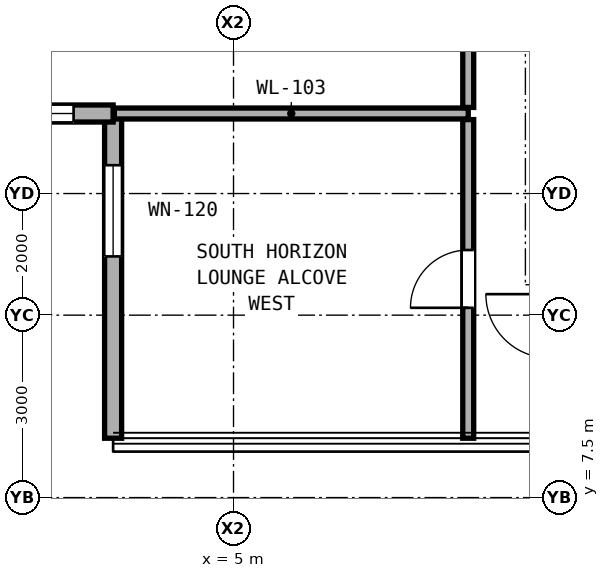
"""IFC4 building model, lengths in metres.
Left out: names, types, materials, properties, quantities, classifications, styles, units other than length and angle.
Written with IfcOpenShell. Run it as: python <this file> out.ifc"""

import sys

from ifc_helpers import new_model, si_unit, direction, frame, frame_2d, origin, place, context, subcontext, project, spatial, rectangle, extrude, element, fill, save


model = new_model("IFC4")
c1 = context("Model", 3, precision=1e-05, world=origin(), true_north=direction((0.0, 1.0)))
c2 = subcontext(c1, "Body", "Model", "MODEL_VIEW")
j1 = project(units=[si_unit("LENGTHUNIT", "METRE"), si_unit("PLANEANGLEUNIT", "RADIAN")], contexts=[c1])
p1 = place(None, origin())
s1 = spatial("IfcSite", under=j1, at=p1, CompositionType="ELEMENT")
p2 = place(p1, origin())
s2 = spatial("IfcBuilding", under=s1, at=p2, CompositionType="ELEMENT")
p3 = place(p2, frame((0.0, 0.0, 78.5)))
s3 = spatial("IfcBuildingStorey", under=s2, at=p3, CompositionType="ELEMENT", Elevation=78.5)
p4 = place(p3, frame((3.02, 13.816, 0.0), z_axis=(0.0, 0.0, 1.0), x_axis=(0.0, -1.0, 0.0)))
e1 = element("IfcWall", 1, at=p4, inside=s3, PredefinedType="SOLIDWALL", context=c2, shape_type="SweptSolid", body=[
    extrude(rectangle(XDim=5.34, YDim=0.28, at=frame_2d((2.67, 0.0))), origin(), (0.0, 0.0, 1.0), 2.56),
])
p5 = place(p4, frame((0.85, 0.0, 0.31)))
e2 = element("IfcOpeningElement", 2, at=p5, cuts=e1, PredefinedType="OPENING", context=c2, shape_type="SweptSolid", body=[
    extrude(rectangle(XDim=1.5, YDim=2.1, at=frame_2d((0.75, 1.05))), frame((0.0, 0.15, 0.0), z_axis=(0.0, -1.0, 0.0), x_axis=(1.0, 0.0, 0.0)), (0.0, 0.0, 1.0), 0.3),
])
p6 = place(p3, frame((-2.32, 13.816, 0.0), z_axis=(0.0, 0.0, 1.0), x_axis=(1.0, 0.0, 0.0)))
e3 = element("IfcWall", 3, at=p6, inside=s3, PredefinedType="SOLIDWALL", context=c2, shape_type="SweptSolid", body=[
    extrude(rectangle(XDim=5.34, YDim=0.28, at=frame_2d((2.67, 0.0))), origin(), (0.0, 0.0, 1.0), 2.56),
])
p7 = place(p6, frame((3.59, 0.0, 0.41)))
e4 = element("IfcOpeningElement", 4, at=p7, cuts=e3, PredefinedType="OPENING", context=c2, shape_type="SweptSolid", body=[
    extrude(rectangle(XDim=1.1, YDim=2.0, at=frame_2d((0.55, 1.0))), frame((0.0, 0.15, 0.0), z_axis=(0.0, -1.0, 0.0), x_axis=(1.0, 0.0, 0.0)), (0.0, 0.0, 1.0), 0.3),
])
p8 = place(p3, frame((3.04, 13.816, 0.0), z_axis=(0.0, 0.0, 1.0), x_axis=(1.0, 0.0, 0.0)))
e5 = element("IfcWall", 5, at=p8, inside=s3, PredefinedType="PARTITIONING", context=c2, shape_type="SweptSolid", body=[
    extrude(rectangle(XDim=5.82, YDim=0.18, at=frame_2d((2.91, 0.0))), origin(), (0.0, 0.0, 1.0), 2.94),
])
p9 = place(p3, frame((8.86, 8.476, 0.0), z_axis=(0.0, 0.0, 1.0), x_axis=(0.0, 1.0, 0.0)))
e6 = element("IfcWall", 6, at=p9, inside=s3, PredefinedType="PARTITIONING", context=c2, shape_type="SweptSolid", body=[
    extrude(rectangle(XDim=5.24, YDim=0.18, at=frame_2d((2.62, 0.0))), origin(), (0.0, 0.0, 1.0), 2.94),
])
p10 = place(p9, frame((2.145, 0.0, 0.0)))
e7 = element("IfcOpeningElement", 7, at=p10, cuts=e6, PredefinedType="OPENING", context=c2, shape_type="SweptSolid", body=[
    extrude(rectangle(XDim=0.95, YDim=2.15, at=frame_2d((0.475, 1.075))), frame((0.0, 0.1, 0.0), z_axis=(0.0, -1.0, 0.0), x_axis=(1.0, 0.0, 0.0)), (0.0, 0.0, 1.0), 0.2),
])
p11 = place(p3, frame((8.86, 13.916, 0.0), z_axis=(0.0, 0.0, 1.0), x_axis=(0.0, 1.0, 0.0)))
e8 = element("IfcWall", 8, at=p11, inside=s3, PredefinedType="PARTITIONING", context=c2, shape_type="SweptSolid", body=[
    extrude(rectangle(XDim=13.089, YDim=0.18, at=frame_2d((6.544, 0.0))), origin(), (0.0, 0.0, 1.0), 2.316),
])
p12 = place(p11, frame((6.02, 0.0, 0.0)))
e9 = element("IfcOpeningElement", 9, at=p12, cuts=e8, PredefinedType="OPENING", context=c2, shape_type="SweptSolid", body=[
    extrude(rectangle(XDim=1.05, YDim=2.2, at=frame_2d((0.525, 1.1))), frame((0.0, 0.1, 0.0), z_axis=(0.0, -1.0, 0.0), x_axis=(1.0, 0.0, 0.0)), (0.0, 0.0, 1.0), 0.2),
])
p13 = place(p5, origin())
e10 = element("IfcWindow", 10, at=p13, inside=s3, PartitioningType="SINGLE_PANEL", PredefinedType="WINDOW", context=c2, shape_type="SweptSolid", body=[
    extrude(rectangle(XDim=1.5, YDim=2.1, at=frame_2d((0.75, 1.05))), frame((0.0, 0.03, 0.0), z_axis=(0.0, -1.0, 0.0), x_axis=(1.0, 0.0, 0.0)), (0.0, 0.0, 1.0), 0.06),
])
fill(e2, e10)
p14 = place(p7, origin())
e11 = element("IfcWindow", 11, at=p14, inside=s3, PartitioningType="SINGLE_PANEL", PredefinedType="WINDOW", context=c2, shape_type="SweptSolid", body=[
    extrude(rectangle(XDim=1.1, YDim=2.0, at=frame_2d((0.55, 1.0))), frame((0.0, 0.03, 0.0), z_axis=(0.0, -1.0, 0.0), x_axis=(1.0, 0.0, 0.0)), (0.0, 0.0, 1.0), 0.06),
])
fill(e4, e11)
p15 = place(p10, origin())
e12 = element("IfcDoor", 12, at=p15, inside=s3, OperationType="SINGLE_SWING_LEFT", PredefinedType="DOOR", context=c2, shape_type="SweptSolid", body=[
    extrude(rectangle(XDim=0.95, YDim=2.15, at=frame_2d((0.475, 1.075))), frame((0.0, 0.025, 0.0), z_axis=(0.0, -1.0, 0.0), x_axis=(1.0, 0.0, 0.0)), (0.0, 0.0, 1.0), 0.05),
])
fill(e7, e12)
save(model, sys.argv[1])
